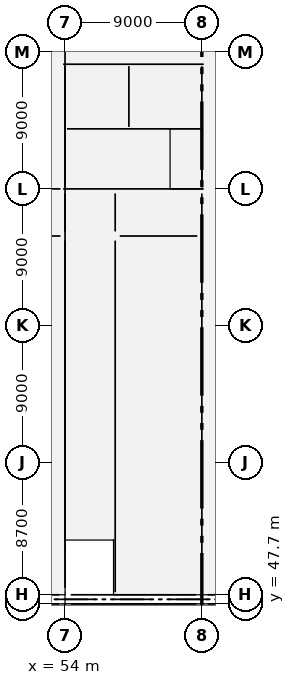
"""IFC4 building model, lengths in metres.
Left out: names, types, materials, properties, quantities, classifications, styles, units other than length and angle.
Written with IfcOpenShell. Run it as: python <this file> out.ifc"""

import sys

from ifc_helpers import new_model, si_unit, direction, frame, frame_2d, origin, origin_2d, place, context, subcontext, project, spatial, rectangle, extrude, element, fill, save


model = new_model("IFC4")
c1 = context("Model", 3, precision=1e-05, world=origin(), true_north=direction((0.0, 1.0)))
c2 = subcontext(c1, "Body", "Model", "MODEL_VIEW")
j1 = project(units=[si_unit("LENGTHUNIT", "METRE"), si_unit("PLANEANGLEUNIT", "RADIAN")], contexts=[c1])
p1 = place(None, origin())
s1 = spatial("IfcSite", under=j1, at=p1, CompositionType="ELEMENT")
p2 = place(p1, origin())
s2 = spatial("IfcBuilding", under=s1, at=p2, CompositionType="ELEMENT")
p3 = place(p2, origin())
s3 = spatial("IfcBuildingStorey", under=s2, at=p3, CompositionType="ELEMENT", Elevation=0.0)
for number, where, z_axis, x_axis in (
    (1, (54.0, 47.7, -0.5), (0.0, 0.0, 1.0), (1.0, 0.0, 0.0)),
    (2, (54.0, 48.3, -0.5), (0.0, 0.0, 1.0), (1.0, 0.0, 0.0)),
):
    element("IfcColumn", number, at=place(p3, frame(where, z_axis=z_axis, x_axis=x_axis)), inside=s3, PredefinedType="COLUMN", context=c2, shape_type="SweptSolid", body=[
        extrude(rectangle(XDim=0.75, YDim=0.55, at=origin_2d()), origin(), (0.0, 0.0, 1.0), 6.8),
    ])
for number, where, z_axis, x_axis in (
    (3, (54.0, 57.0, -0.5), (0.0, 0.0, 1.0), (1.0, 0.0, 0.0)),
    (4, (54.0, 66.0, -0.5), (0.0, 0.0, 1.0), (1.0, 0.0, 0.0)),
    (5, (54.0, 75.0, -0.5), (0.0, 0.0, 1.0), (1.0, 0.0, 0.0)),
    (6, (54.0, 84.0, -0.5), (0.0, 0.0, 1.0), (1.0, 0.0, 0.0)),
):
    element("IfcColumn", number, at=place(p3, frame(where, z_axis=z_axis, x_axis=x_axis)), inside=s3, PredefinedType="COLUMN", context=c2, shape_type="SweptSolid", body=[
        extrude(rectangle(XDim=0.75, YDim=0.75, at=origin_2d()), origin(), (0.0, 0.0, 1.0), 6.8),
    ])
for number, where, z_axis, x_axis in (
    (7, (63.0, 47.7, -0.5), (0.0, 0.0, 1.0), (1.0, 0.0, 0.0)),
    (8, (63.0, 48.3, -0.5), (0.0, 0.0, 1.0), (1.0, 0.0, 0.0)),
):
    element("IfcColumn", number, at=place(p3, frame(where, z_axis=z_axis, x_axis=x_axis)), inside=s3, PredefinedType="COLUMN", context=c2, shape_type="SweptSolid", body=[
        extrude(rectangle(XDim=0.75, YDim=0.55, at=origin_2d()), origin(), (0.0, 0.0, 1.0), 6.8),
    ])
for number, where, z_axis, x_axis in (
    (9, (63.0, 57.0, -0.5), (0.0, 0.0, 1.0), (1.0, 0.0, 0.0)),
    (10, (63.0, 66.0, -0.5), (0.0, 0.0, 1.0), (1.0, 0.0, 0.0)),
    (11, (63.0, 75.0, -0.5), (0.0, 0.0, 1.0), (1.0, 0.0, 0.0)),
    (12, (63.0, 84.0, -0.5), (0.0, 0.0, 1.0), (1.0, 0.0, 0.0)),
):
    element("IfcColumn", number, at=place(p3, frame(where, z_axis=z_axis, x_axis=x_axis)), inside=s3, PredefinedType="COLUMN", context=c2, shape_type="SweptSolid", body=[
        extrude(rectangle(XDim=0.75, YDim=0.75, at=origin_2d()), origin(), (0.0, 0.0, 1.0), 6.8),
    ])
for number, where, z_axis, x_axis in (
    (13, (45.375, 47.7, 0.0), (0.0, 0.0, 1.0), (1.0, 0.0, 0.0)),
    (14, (54.375, 47.7, 0.0), (0.0, 0.0, 1.0), (1.0, 0.0, 0.0)),
):
    element("IfcWall", number, at=place(p3, frame(where, z_axis=z_axis, x_axis=x_axis)), inside=s3, PredefinedType="SOLIDWALL", context=c2, shape_type="SweptSolid", body=[
        extrude(rectangle(XDim=8.25, YDim=0.38, at=frame_2d((4.125, 0.0))), origin(), (0.0, 0.0, 1.0), 5.08),
    ])
p4 = place(p3, frame((63.375, 47.7, 0.0), z_axis=(0.0, 0.0, 1.0), x_axis=(1.0, 0.0, 0.0)))
e15 = element("IfcWall", 15, at=p4, inside=s3, PredefinedType="SOLIDWALL", context=c2, shape_type="SweptSolid", body=[
    extrude(rectangle(XDim=8.05, YDim=0.38, at=frame_2d((4.025, 0.0))), origin(), (0.0, 0.0, 1.0), 5.08),
])
p5 = place(p3, frame((45.375, 48.3, 0.0), z_axis=(0.0, 0.0, 1.0), x_axis=(1.0, 0.0, 0.0)))
e16 = element("IfcWall", 16, at=p5, inside=s3, PredefinedType="SOLIDWALL", context=c2, shape_type="SweptSolid", body=[
    extrude(rectangle(XDim=8.25, YDim=0.38, at=frame_2d((4.125, 0.0))), origin(), (0.0, 0.0, 1.0), 5.08),
])
p6 = place(p3, frame((54.375, 48.3, 0.0), z_axis=(0.0, 0.0, 1.0), x_axis=(1.0, 0.0, 0.0)))
e17 = element("IfcWall", 17, at=p6, inside=s3, PredefinedType="SOLIDWALL", context=c2, shape_type="SweptSolid", body=[
    extrude(rectangle(XDim=8.25, YDim=0.38, at=frame_2d((4.125, 0.0))), origin(), (0.0, 0.0, 1.0), 5.08),
])
p7 = place(p6, frame((3.325, 0.0, 3.59)))
e18 = element("IfcOpeningElement", 18, at=p7, cuts=e17, PredefinedType="OPENING", context=c2, shape_type="SweptSolid", body=[
    extrude(rectangle(XDim=1.6, YDim=1.45, at=frame_2d((0.8, 0.725))), frame((0.0, 0.2, 0.0), z_axis=(0.0, -1.0, 0.0), x_axis=(1.0, 0.0, 0.0)), (0.0, 0.0, 1.0), 0.4),
])
p8 = place(p3, frame((63.375, 48.3, 0.0), z_axis=(0.0, 0.0, 1.0), x_axis=(1.0, 0.0, 0.0)))
e19 = element("IfcWall", 19, at=p8, inside=s3, PredefinedType="SOLIDWALL", context=c2, shape_type="SweptSolid", body=[
    extrude(rectangle(XDim=8.05, YDim=0.38, at=frame_2d((4.025, 0.0))), origin(), (0.0, 0.0, 1.0), 5.08),
])
p9 = place(p3, frame((53.875, 75.0, -0.5), z_axis=(0.0, 0.0, 1.0), x_axis=(1.0, 0.0, 0.0)))
e20 = element("IfcWall", 20, at=p9, inside=s3, PredefinedType="SOLIDWALL", context=c2, shape_type="SweptSolid", body=[
    extrude(rectangle(XDim=9.25, YDim=0.25, at=frame_2d((4.625, 0.0))), origin(), (0.0, 0.0, 1.0), 6.8),
])
p10 = place(p3, frame((53.875, 83.2, -0.5), z_axis=(0.0, 0.0, 1.0), x_axis=(1.0, 0.0, 0.0)))
e21 = element("IfcWall", 21, at=p10, inside=s3, PredefinedType="SOLIDWALL", context=c2, shape_type="SweptSolid", body=[
    extrude(rectangle(XDim=9.25, YDim=0.25, at=frame_2d((4.625, 0.0))), origin(), (0.0, 0.0, 1.0), 6.8),
])
p11 = place(p10, frame((5.775, 0.0, 0.5)))
e22 = element("IfcOpeningElement", 22, at=p11, cuts=e21, PredefinedType="OPENING", context=c2, shape_type="SweptSolid", body=[
    extrude(rectangle(XDim=1.6, YDim=2.2, at=frame_2d((0.8, 1.1))), frame((0.0, 0.135, 0.0), z_axis=(0.0, -1.0, 0.0), x_axis=(1.0, 0.0, 0.0)), (0.0, 0.0, 1.0), 0.27),
])
p12 = place(p3, frame((54.0, 75.125, -0.5), z_axis=(0.0, 0.0, 1.0), x_axis=(0.0, 1.0, 0.0)))
e23 = element("IfcWall", 23, at=p12, inside=s3, PredefinedType="SOLIDWALL", context=c2, shape_type="SweptSolid", body=[
    extrude(rectangle(XDim=7.95, YDim=0.25, at=frame_2d((3.975, 0.0))), origin(), (0.0, 0.0, 1.0), 6.8),
])
p13 = place(p12, frame((1.15, 0.0, 0.5)))
e24 = element("IfcOpeningElement", 24, at=p13, cuts=e23, PredefinedType="OPENING", context=c2, shape_type="SweptSolid", body=[
    extrude(rectangle(XDim=1.2, YDim=2.2, at=frame_2d((0.6, 1.1))), frame((0.0, 0.135, 0.0), z_axis=(0.0, -1.0, 0.0), x_axis=(1.0, 0.0, 0.0)), (0.0, 0.0, 1.0), 0.27),
])
p14 = place(p3, frame((63.0, 75.125, -0.5), z_axis=(0.0, 0.0, 1.0), x_axis=(0.0, 1.0, 0.0)))
e25 = element("IfcWall", 25, at=p14, inside=s3, PredefinedType="SOLIDWALL", context=c2, shape_type="SweptSolid", body=[
    extrude(rectangle(XDim=7.95, YDim=0.25, at=frame_2d((3.975, 0.0))), origin(), (0.0, 0.0, 1.0), 6.8),
])
p15 = place(p3, frame((54.125, 78.95, -0.5), z_axis=(0.0, 0.0, 1.0), x_axis=(1.0, 0.0, 0.0)))
e26 = element("IfcWall", 26, at=p15, inside=s3, PredefinedType="SOLIDWALL", context=c2, shape_type="SweptSolid", body=[
    extrude(rectangle(XDim=8.75, YDim=0.25, at=frame_2d((4.375, 0.0))), origin(), (0.0, 0.0, 1.0), 6.8),
])
p16 = place(p3, frame((58.2, 79.075, -0.5), z_axis=(0.0, 0.0, 1.0), x_axis=(0.0, 1.0, 0.0)))
e27 = element("IfcWall", 27, at=p16, inside=s3, PredefinedType="SOLIDWALL", context=c2, shape_type="SweptSolid", body=[
    extrude(rectangle(XDim=4.0, YDim=0.25, at=frame_2d((2.0, 0.0))), origin(), (0.0, 0.0, 1.0), 6.8),
])
p17 = place(p16, frame((1.2, 0.0, 0.5)))
e28 = element("IfcOpeningElement", 28, at=p17, cuts=e27, PredefinedType="OPENING", context=c2, shape_type="SweptSolid", body=[
    extrude(rectangle(XDim=1.6, YDim=2.4, at=frame_2d((0.8, 1.2))), frame((0.0, 0.135, 0.0), z_axis=(0.0, -1.0, 0.0), x_axis=(1.0, 0.0, 0.0)), (0.0, 0.0, 1.0), 0.27),
])
p18 = place(p3, frame((27.3, 71.9, 0.0), z_axis=(0.0, 0.0, 1.0), x_axis=(1.0, 0.0, 0.0)))
e29 = element("IfcWall", 29, at=p18, inside=s3, PredefinedType="STANDARD", context=c2, shape_type="SweptSolid", body=[
    extrude(rectangle(XDim=26.4, YDim=0.21, at=frame_2d((13.2, 0.0))), origin(), (0.0, 0.0, 1.0), 5.95),
])
p19 = place(p18, frame((12.27, 0.0, 0.0)))
e30 = element("IfcOpeningElement", 30, at=p19, cuts=e29, PredefinedType="OPENING", context=c2, shape_type="SweptSolid", body=[
    extrude(rectangle(XDim=1.86, YDim=2.45, at=frame_2d((0.93, 1.225))), frame((0.0, 0.115, 0.0), z_axis=(0.0, -1.0, 0.0), x_axis=(1.0, 0.0, 0.0)), (0.0, 0.0, 1.0), 0.23),
])
p20 = place(p3, frame((27.3, 75.0, 0.0), z_axis=(0.0, 0.0, 1.0), x_axis=(1.0, 0.0, 0.0)))
e31 = element("IfcWall", 31, at=p20, inside=s3, PredefinedType="STANDARD", context=c2, shape_type="SweptSolid", body=[
    extrude(rectangle(XDim=26.4, YDim=0.195, at=frame_2d((13.2, 0.0))), origin(), (0.0, 0.0, 1.0), 5.13),
])
p21 = place(p20, frame((12.125, 0.0, 0.0)))
e32 = element("IfcOpeningElement", 32, at=p21, cuts=e31, PredefinedType="OPENING", context=c2, shape_type="SweptSolid", body=[
    extrude(rectangle(XDim=2.15, YDim=2.55, at=frame_2d((1.075, 1.275))), frame((0.0, 0.107, 0.0), z_axis=(0.0, -1.0, 0.0), x_axis=(1.0, 0.0, 0.0)), (0.0, 0.0, 1.0), 0.215),
])
p22 = place(p3, frame((54.0, 72.2, 0.0), z_axis=(0.0, 0.0, 1.0), x_axis=(0.0, 1.0, 0.0)))
e33 = element("IfcWall", 33, at=p22, inside=s3, PredefinedType="PARTITIONING", context=c2, shape_type="SweptSolid", body=[
    extrude(rectangle(XDim=2.5, YDim=0.14, at=frame_2d((1.25, 0.0))), origin(), (0.0, 0.0, 1.0), 5.18),
])
p23 = place(p22, frame((0.78, 0.0, 0.0)))
e34 = element("IfcOpeningElement", 34, at=p23, cuts=e33, PredefinedType="OPENING", context=c2, shape_type="SweptSolid", body=[
    extrude(rectangle(XDim=0.94, YDim=2.14, at=frame_2d((0.47, 1.07))), frame((0.0, 0.08, 0.0), z_axis=(0.0, -1.0, 0.0), x_axis=(1.0, 0.0, 0.0)), (0.0, 0.0, 1.0), 0.16),
])
p24 = place(p3, frame((54.0, 48.75, 0.0), z_axis=(0.0, 0.0, 1.0), x_axis=(0.0, 1.0, 0.0)))
e35 = element("IfcWall", 35, at=p24, inside=s3, PredefinedType="STANDARD", context=c2, shape_type="SweptSolid", body=[
    extrude(rectangle(XDim=22.85, YDim=0.21, at=frame_2d((11.425, 0.0))), origin(), (0.0, 0.0, 1.0), 5.18),
])
p25 = place(p24, frame((11.675, 0.0, 0.0)))
e36 = element("IfcOpeningElement", 36, at=p25, cuts=e35, PredefinedType="OPENING", context=c2, shape_type="SweptSolid", body=[
    extrude(rectangle(XDim=2.15, YDim=2.55, at=frame_2d((1.075, 1.275))), frame((0.0, 0.115, 0.0), z_axis=(0.0, -1.0, 0.0), x_axis=(1.0, 0.0, 0.0)), (0.0, 0.0, 1.0), 0.23),
])
p26 = place(p3, frame((57.3, 48.47, 0.0), z_axis=(0.0, 0.0, 1.0), x_axis=(0.0, 1.0, 0.0)))
e37 = element("IfcWall", 37, at=p26, inside=s3, PredefinedType="PARTITIONING", context=c2, shape_type="SweptSolid", body=[
    extrude(rectangle(XDim=23.13, YDim=0.1, at=frame_2d((11.565, 0.0))), origin(), (0.0, 0.0, 1.0), 5.95),
])
p27 = place(p26, frame((12.49, 0.0, 0.0)))
e38 = element("IfcOpeningElement", 38, at=p27, cuts=e37, PredefinedType="OPENING", context=c2, shape_type="SweptSolid", body=[
    extrude(rectangle(XDim=1.08, YDim=2.15, at=frame_2d((0.54, 1.075))), frame((0.0, 0.06, 0.0), z_axis=(0.0, -1.0, 0.0), x_axis=(1.0, 0.0, 0.0)), (0.0, 0.0, 1.0), 0.12),
])
p28 = place(p3, frame((57.3, 72.2, 0.0), z_axis=(0.0, 0.0, 1.0), x_axis=(0.0, 1.0, 0.0)))
e39 = element("IfcWall", 39, at=p28, inside=s3, PredefinedType="PARTITIONING", context=c2, shape_type="SweptSolid", body=[
    extrude(rectangle(XDim=2.5, YDim=0.14, at=frame_2d((1.25, 0.0))), origin(), (0.0, 0.0, 1.0), 5.95),
])
p29 = place(p28, frame((0.78, 0.0, 0.0)))
e40 = element("IfcOpeningElement", 40, at=p29, cuts=e39, PredefinedType="OPENING", context=c2, shape_type="SweptSolid", body=[
    extrude(rectangle(XDim=0.94, YDim=2.14, at=frame_2d((0.47, 1.07))), frame((0.0, 0.08, 0.0), z_axis=(0.0, -1.0, 0.0), x_axis=(1.0, 0.0, 0.0)), (0.0, 0.0, 1.0), 0.16),
])
p30 = place(p3, frame((57.6, 71.9, 0.0), z_axis=(0.0, 0.0, 1.0), x_axis=(1.0, 0.0, 0.0)))
e41 = element("IfcWall", 41, at=p30, inside=s3, PredefinedType="PARTITIONING", context=c2, shape_type="SweptSolid", body=[
    extrude(rectangle(XDim=5.1, YDim=0.125, at=frame_2d((2.55, 0.0))), origin(), (0.0, 0.0, 1.0), 5.95),
])
p31 = place(p30, frame((2.04, 0.0, 0.0)))
e42 = element("IfcOpeningElement", 42, at=p31, cuts=e41, PredefinedType="OPENING", context=c2, shape_type="SweptSolid", body=[
    extrude(rectangle(XDim=1.02, YDim=2.18, at=frame_2d((0.51, 1.09))), frame((0.0, 0.073, 0.0), z_axis=(0.0, -1.0, 0.0), x_axis=(1.0, 0.0, 0.0)), (0.0, 0.0, 1.0), 0.145),
])
p32 = place(p3, frame((63.0, 48.75, 0.0), z_axis=(0.0, 0.0, 1.0), x_axis=(0.0, 1.0, 0.0)))
e43 = element("IfcWall", 43, at=p32, inside=s3, PredefinedType="STANDARD", context=c2, shape_type="SweptSolid", body=[
    extrude(rectangle(XDim=22.85, YDim=0.21, at=frame_2d((11.425, 0.0))), origin(), (0.0, 0.0, 1.0), 5.18),
])
p33 = place(p3, frame((63.0, 72.2, 0.0), z_axis=(0.0, 0.0, 1.0), x_axis=(0.0, 1.0, 0.0)))
e44 = element("IfcWall", 44, at=p33, inside=s3, PredefinedType="STANDARD", context=c2, shape_type="SweptSolid", body=[
    extrude(rectangle(XDim=2.5, YDim=0.195, at=frame_2d((1.25, 0.0))), origin(), (0.0, 0.0, 1.0), 5.18),
])
p34 = place(p33, frame((0.175, 0.0, 0.0)))
e45 = element("IfcOpeningElement", 45, at=p34, cuts=e44, PredefinedType="OPENING", context=c2, shape_type="SweptSolid", body=[
    extrude(rectangle(XDim=2.15, YDim=2.55, at=frame_2d((1.075, 1.275))), frame((0.0, 0.107, 0.0), z_axis=(0.0, -1.0, 0.0), x_axis=(1.0, 0.0, 0.0)), (0.0, 0.0, 1.0), 0.215),
])
p35 = place(p7, origin())
e46 = element("IfcWindow", 46, at=p35, inside=s3, PartitioningType="DOUBLE_PANEL_HORIZONTAL", PredefinedType="WINDOW", context=c2, shape_type="SweptSolid", body=[
    extrude(rectangle(XDim=1.6, YDim=1.45, at=frame_2d((0.8, 0.725))), frame((0.0, 0.03, 0.0), z_axis=(0.0, -1.0, 0.0), x_axis=(1.0, 0.0, 0.0)), (0.0, 0.0, 1.0), 0.06),
])
fill(e18, e46)
p36 = place(p17, origin())
e47 = element("IfcDoor", 47, at=p36, inside=s3, OperationType="SLIDING_TO_LEFT", PredefinedType="DOOR", context=c2, shape_type="SweptSolid", body=[
    extrude(rectangle(XDim=1.6, YDim=2.4, at=frame_2d((0.8, 1.2))), frame((0.0, 0.025, 0.0), z_axis=(0.0, -1.0, 0.0), x_axis=(1.0, 0.0, 0.0)), (0.0, 0.0, 1.0), 0.05),
])
fill(e28, e47)
p37 = place(p13, origin())
e48 = element("IfcDoor", 48, at=p37, inside=s3, OperationType="SINGLE_SWING_LEFT", PredefinedType="DOOR", context=c2, shape_type="SweptSolid", body=[
    extrude(rectangle(XDim=1.2, YDim=2.2, at=frame_2d((0.6, 1.1))), frame((0.0, 0.025, 0.0), z_axis=(0.0, -1.0, 0.0), x_axis=(1.0, 0.0, 0.0)), (0.0, 0.0, 1.0), 0.05),
])
fill(e24, e48)
p38 = place(p11, origin())
e49 = element("IfcDoor", 49, at=p38, inside=s3, OperationType="SINGLE_SWING_RIGHT", PredefinedType="DOOR", context=c2, shape_type="SweptSolid", body=[
    extrude(rectangle(XDim=1.6, YDim=2.2, at=frame_2d((0.8, 1.1))), frame((0.0, 0.025, 0.0), z_axis=(0.0, -1.0, 0.0), x_axis=(1.0, 0.0, 0.0)), (0.0, 0.0, 1.0), 0.05),
])
fill(e22, e49)
p39 = place(p23, origin())
e50 = element("IfcDoor", 50, at=p39, inside=s3, OperationType="SINGLE_SWING_RIGHT", PredefinedType="DOOR", context=c2, shape_type="SweptSolid", body=[
    extrude(rectangle(XDim=0.94, YDim=2.14, at=frame_2d((0.47, 1.07))), frame((0.0, 0.025, 0.0), z_axis=(0.0, -1.0, 0.0), x_axis=(1.0, 0.0, 0.0)), (0.0, 0.0, 1.0), 0.05),
])
fill(e34, e50)
p40 = place(p25, origin())
e51 = element("IfcDoor", 51, at=p40, inside=s3, OperationType="SLIDING_TO_LEFT", PredefinedType="DOOR", context=c2, shape_type="SweptSolid", body=[
    extrude(rectangle(XDim=2.15, YDim=2.55, at=frame_2d((1.075, 1.275))), frame((0.0, 0.025, 0.0), z_axis=(0.0, -1.0, 0.0), x_axis=(1.0, 0.0, 0.0)), (0.0, 0.0, 1.0), 0.05),
])
fill(e36, e51)
p41 = place(p27, origin())
e52 = element("IfcDoor", 52, at=p41, inside=s3, OperationType="SINGLE_SWING_RIGHT", PredefinedType="DOOR", context=c2, shape_type="SweptSolid", body=[
    extrude(rectangle(XDim=1.08, YDim=2.15, at=frame_2d((0.54, 1.075))), frame((0.0, 0.025, 0.0), z_axis=(0.0, -1.0, 0.0), x_axis=(1.0, 0.0, 0.0)), (0.0, 0.0, 1.0), 0.05),
])
fill(e38, e52)
p42 = place(p29, origin())
e53 = element("IfcDoor", 53, at=p42, inside=s3, OperationType="SINGLE_SWING_LEFT", PredefinedType="DOOR", context=c2, shape_type="SweptSolid", body=[
    extrude(rectangle(XDim=0.94, YDim=2.14, at=frame_2d((0.47, 1.07))), frame((0.0, 0.025, 0.0), z_axis=(0.0, -1.0, 0.0), x_axis=(1.0, 0.0, 0.0)), (0.0, 0.0, 1.0), 0.05),
])
fill(e40, e53)
p43 = place(p31, origin())
e54 = element("IfcDoor", 54, at=p43, inside=s3, OperationType="SINGLE_SWING_RIGHT", PredefinedType="DOOR", context=c2, shape_type="SweptSolid", body=[
    extrude(rectangle(XDim=1.02, YDim=2.18, at=frame_2d((0.51, 1.09))), frame((0.0, 0.025, 0.0), z_axis=(0.0, -1.0, 0.0), x_axis=(1.0, 0.0, 0.0)), (0.0, 0.0, 1.0), 0.05),
])
fill(e42, e54)
p44 = place(p34, origin())
e55 = element("IfcDoor", 55, at=p44, inside=s3, OperationType="SLIDING_TO_LEFT", PredefinedType="DOOR", context=c2, shape_type="SweptSolid", body=[
    extrude(rectangle(XDim=2.15, YDim=2.55, at=frame_2d((1.075, 1.275))), frame((0.0, 0.025, 0.0), z_axis=(0.0, -1.0, 0.0), x_axis=(1.0, 0.0, 0.0)), (0.0, 0.0, 1.0), 0.05),
])
fill(e45, e55)
save(model, sys.argv[1])
